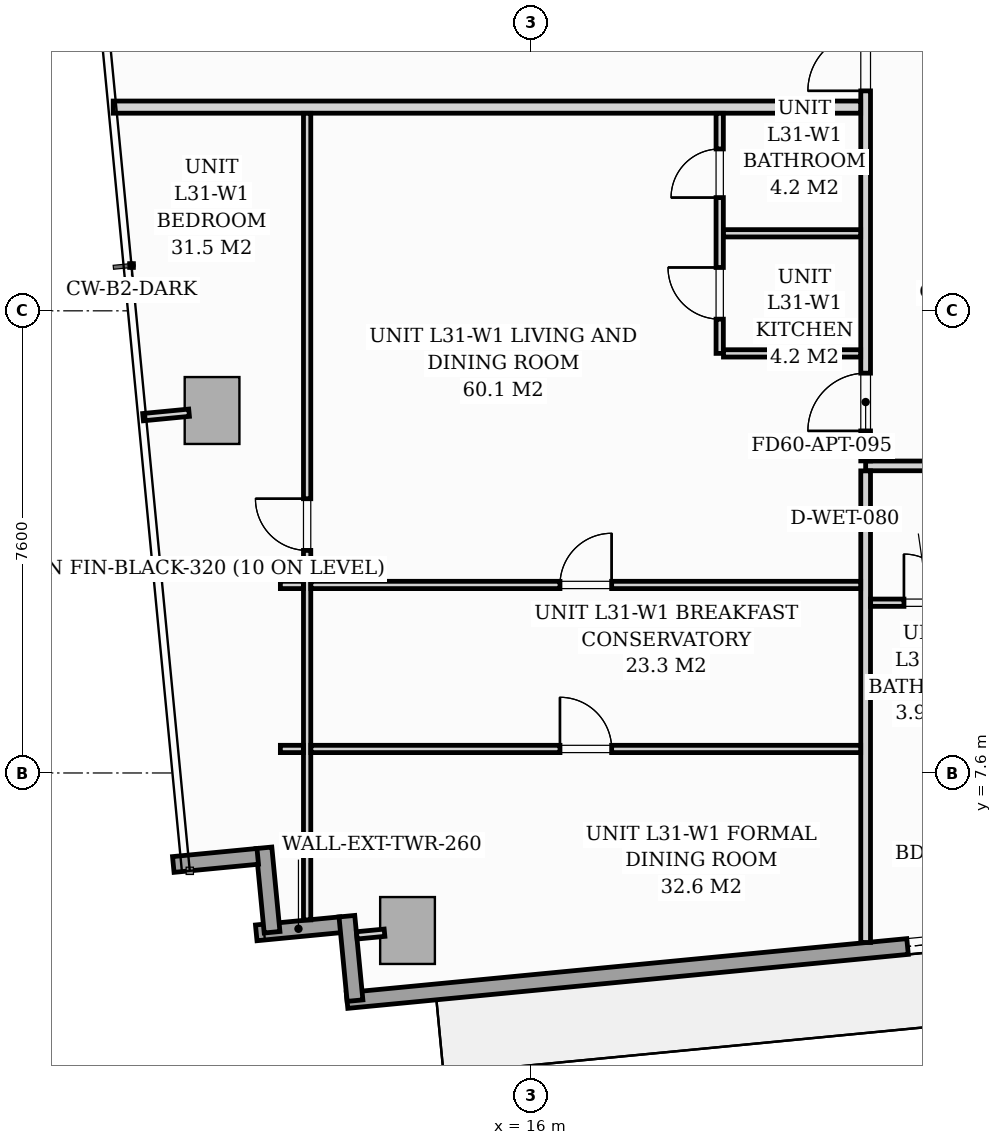
"""IFC4 building model, lengths in metres.
Left out: names, types, materials, properties, quantities, classifications, styles, units other than length and angle.
Written with IfcOpenShell. Run it as: python <this file> out.ifc"""

import sys

from ifc_helpers import new_model, si_unit, direction, frame, frame_2d, origin, origin_2d, place, context, subcontext, project, spatial, rectangle, extrude, source, transform, mapped, element, fill, save


model = new_model("IFC4")
c1 = context("Model", 3, precision=1e-05, world=origin(), true_north=direction((0.0, 1.0)))
c2 = subcontext(c1, "Body", "Model", "MODEL_VIEW")
j1 = project(units=[si_unit("LENGTHUNIT", "METRE"), si_unit("PLANEANGLEUNIT", "RADIAN")], contexts=[c1])
p1 = place(None, origin())
s1 = spatial("IfcSite", under=j1, at=p1, CompositionType="ELEMENT")
p2 = place(p1, origin())
s2 = spatial("IfcBuilding", under=s1, at=p2, CompositionType="ELEMENT")
p3 = place(p2, frame((0.0, 0.0, 109.8)))
s3 = spatial("IfcBuildingStorey", under=s2, at=p3, CompositionType="ELEMENT", Elevation=109.8)
m1 = source(origin(), c2, "Body", "SweptSolid", [
    extrude(rectangle(XDim=0.9, YDim=1.1, at=origin_2d()), origin(), (0.0, 0.0, 1.0), 3.196),
])
for number, where, z_axis, x_axis in (
    (1, (13.966, 5.01, 0.002), (0.0, 0.0, 1.0), (0.995, 0.096, 0.0)),
    (2, (10.752, 13.561, 0.002), (0.0, 0.0, 1.0), (0.995, 0.096, 0.0)),
):
    element("IfcColumn", number, at=place(p3, frame(where, z_axis=z_axis, x_axis=x_axis)), inside=s3, PredefinedType="COLUMN", context=c2, shape_type="MappedRepresentation", body=[
        mapped(m1, transform((0.0, 0.0, 0.0), scale=1.0)),
    ])
for number, where, z_axis, x_axis in (
    (3, (12.867, 5.104, 0.0), (0.0, 0.0, 1.0), (-0.995, -0.096, 0.0)),
    (4, (11.739, 4.981, 0.0), (0.0, 0.0, 1.0), (-0.096, 0.995, 0.0)),
):
    element("IfcWall", number, at=place(p3, frame(where, z_axis=z_axis, x_axis=x_axis)), inside=s3, PredefinedType="STANDARD", context=c2, shape_type="SweptSolid", body=[
        extrude(rectangle(XDim=1.395, YDim=0.26, at=frame_2d((0.697, 0.0))), origin(), (0.0, 0.0, 1.0), 2.94),
    ])
p4 = place(p3, frame((11.503, 6.229, 0.0), z_axis=(0.0, 0.0, 1.0), x_axis=(-0.995391056452, -0.09589913835, 0.0)))
e5 = element("IfcWall", 5, at=p4, inside=s3, PredefinedType="STANDARD", context=c2, shape_type="SweptSolid", body=[
    extrude(rectangle(XDim=1.395, YDim=0.26, at=frame_2d((0.698, 0.0))), origin(), (0.0, 0.0, 1.0), 2.94),
])
p5 = place(p3, frame((31.994, 5.69, 0.0), z_axis=(0.0, 0.0, 1.0), x_axis=(-0.995396521236, -0.095842399342, 0.0)))
e6 = element("IfcWall", 6, at=p5, inside=s3, PredefinedType="STANDARD", context=c2, shape_type="SweptSolid", body=[
    extrude(rectangle(XDim=19.11, YDim=0.26, at=frame_2d((9.555, 0.0))), origin(), (0.0, 0.0, 1.0), 2.94),
])
p6 = place(p5, frame((8.05, 0.0, 0.0)))
e7 = element("IfcOpeningElement", 7, at=p6, cuts=e6, PredefinedType="OPENING", context=c2, shape_type="SweptSolid", body=[
    extrude(rectangle(XDim=1.8, YDim=2.06, at=frame_2d((0.9, 1.03))), frame((0.0, 0.14, 0.0), z_axis=(0.0, -1.0, 0.0), x_axis=(1.0, 0.0, 0.0)), (0.0, 0.0, 1.0), 0.28),
])
p7 = place(p5, frame((2.5, 0.0, 0.65)))
e8 = element("IfcOpeningElement", 8, at=p7, cuts=e6, PredefinedType="OPENING", context=c2, shape_type="SweptSolid", body=[
    extrude(rectangle(XDim=1.6, YDim=1.5, at=frame_2d((0.8, 0.75))), frame((0.0, 0.14, 0.0), z_axis=(0.0, -1.0, 0.0), x_axis=(1.0, 0.0, 0.0)), (0.0, 0.0, 1.0), 0.28),
])
p8 = place(p3, frame((13.103, 3.856, 0.0), z_axis=(0.0, 0.0, 1.0), x_axis=(-0.09589913835, 0.995391056452, 0.0)))
e9 = element("IfcWall", 9, at=p8, inside=s3, PredefinedType="STANDARD", context=c2, shape_type="SweptSolid", body=[
    extrude(rectangle(XDim=1.395, YDim=0.26, at=frame_2d((0.698, 0.0))), origin(), (0.0, 0.0, 1.0), 2.94),
])
p9 = place(p3, frame((21.5, 12.65, 0.0), z_axis=(0.0, 0.0, 1.0), x_axis=(1.0, 0.0, 0.0)))
e10 = element("IfcWall", 10, at=p9, inside=s3, PredefinedType="PARTITIONING", context=c2, shape_type="SweptSolid", body=[
    extrude(rectangle(XDim=26.2, YDim=0.16, at=frame_2d((13.1, 0.0))), origin(), (0.0, 0.0, 1.0), 2.94),
])
p10 = place(p9, frame((5.927, 0.0, 0.0)))
e11 = element("IfcOpeningElement", 11, at=p10, cuts=e10, PredefinedType="OPENING", context=c2, shape_type="SweptSolid", body=[
    extrude(rectangle(XDim=0.95, YDim=2.06, at=frame_2d((0.475, 1.03))), frame((0.0, 0.09, 0.0), z_axis=(0.0, -1.0, 0.0), x_axis=(1.0, 0.0, 0.0)), (0.0, 0.0, 1.0), 0.18),
])
p11 = place(p9, frame((10.575, 0.0, 0.0)))
e12 = element("IfcOpeningElement", 12, at=p11, cuts=e10, PredefinedType="OPENING", context=c2, shape_type="SweptSolid", body=[
    extrude(rectangle(XDim=0.95, YDim=2.06, at=frame_2d((0.475, 1.03))), frame((0.0, 0.09, 0.0), z_axis=(0.0, -1.0, 0.0), x_axis=(1.0, 0.0, 0.0)), (0.0, 0.0, 1.0), 0.18),
])
p12 = place(p9, frame((19.322, 0.0, 0.0)))
e13 = element("IfcOpeningElement", 13, at=p12, cuts=e10, PredefinedType="OPENING", context=c2, shape_type="SweptSolid", body=[
    extrude(rectangle(XDim=0.95, YDim=2.06, at=frame_2d((0.475, 1.03))), frame((0.0, 0.09, 0.0), z_axis=(0.0, -1.0, 0.0), x_axis=(1.0, 0.0, 0.0)), (0.0, 0.0, 1.0), 0.18),
])
p13 = place(p3, frame((21.5, 4.812, 0.0), z_axis=(0.0, 0.0, 1.0), x_axis=(0.0, 1.0, 0.0)))
e14 = element("IfcWall", 14, at=p13, inside=s3, PredefinedType="PARTITIONING", context=c2, shape_type="SweptSolid", body=[
    extrude(rectangle(XDim=7.756, YDim=0.16, at=frame_2d((3.878, 0.0))), origin(), (0.0, 0.0, 1.0), 2.94),
])
p14 = place(p3, frame((21.5, 12.732, 0.0), z_axis=(0.0, 0.0, 1.0), x_axis=(0.0, 1.0, 0.0)))
e15 = element("IfcWall", 15, at=p14, inside=s3, PredefinedType="PARTITIONING", context=c2, shape_type="SweptSolid", body=[
    extrude(rectangle(XDim=11.647, YDim=0.16, at=frame_2d((5.823, 0.0))), origin(), (0.0, 0.0, 1.0), 2.94),
])
p15 = place(p14, frame((0.493, 0.0, 0.0)))
e16 = element("IfcOpeningElement", 16, at=p15, cuts=e15, PredefinedType="OPENING", context=c2, shape_type="SweptSolid", body=[
    extrude(rectangle(XDim=0.95, YDim=2.06, at=frame_2d((0.475, 1.03))), frame((0.0, 0.09, 0.0), z_axis=(0.0, -1.0, 0.0), x_axis=(1.0, 0.0, 0.0)), (0.0, 0.0, 1.0), 0.18),
])
p16 = place(p14, frame((6.085, 0.0, 0.0)))
e17 = element("IfcOpeningElement", 17, at=p16, cuts=e15, PredefinedType="OPENING", context=c2, shape_type="SweptSolid", body=[
    extrude(rectangle(XDim=0.95, YDim=2.06, at=frame_2d((0.475, 1.03))), frame((0.0, 0.09, 0.0), z_axis=(0.0, -1.0, 0.0), x_axis=(1.0, 0.0, 0.0)), (0.0, 0.0, 1.0), 0.18),
])
p17 = place(p3, frame((21.582, 10.4, 0.0), z_axis=(0.0, 0.0, 1.0), x_axis=(1.0, 0.0, 0.0)))
e18 = element("IfcWall", 18, at=p17, inside=s3, PredefinedType="PARTITIONING", context=c2, shape_type="SweptSolid", body=[
    extrude(rectangle(XDim=4.098, YDim=0.12, at=frame_2d((2.049, 0.0))), origin(), (0.0, 0.0, 1.0), 2.94),
])
p18 = place(p17, frame((0.548, 0.0, 0.0)))
e19 = element("IfcOpeningElement", 19, at=p18, cuts=e18, PredefinedType="OPENING", context=c2, shape_type="SweptSolid", body=[
    extrude(rectangle(XDim=0.8, YDim=2.02, at=frame_2d((0.4, 1.01))), frame((0.0, 0.07, 0.0), z_axis=(0.0, -1.0, 0.0), x_axis=(1.0, 0.0, 0.0)), (0.0, 0.0, 1.0), 0.14),
])
p19 = place(p17, frame((2.573, 0.0, 0.0)))
e20 = element("IfcOpeningElement", 20, at=p19, cuts=e18, PredefinedType="OPENING", context=c2, shape_type="SweptSolid", body=[
    extrude(rectangle(XDim=0.85, YDim=2.05, at=frame_2d((0.425, 1.025))), frame((0.0, 0.07, 0.0), z_axis=(0.0, -1.0, 0.0), x_axis=(1.0, 0.0, 0.0)), (0.0, 0.0, 1.0), 0.14),
])
p20 = place(p3, frame((9.126, 18.55, 0.0), z_axis=(0.0, 0.0, 1.0), x_axis=(1.0, 0.0, 0.0)))
e21 = element("IfcWall", 21, at=p20, inside=s3, PredefinedType="PARTITIONING", context=c2, shape_type="SweptSolid", body=[
    extrude(rectangle(XDim=12.292, YDim=0.2, at=frame_2d((6.146, 0.0))), origin(), (0.0, 0.0, 1.0), 2.94),
])
p21 = place(p3, frame((19.1, 14.5, 0.0), z_axis=(0.0, 0.0, 1.0), x_axis=(0.0, 1.0, 0.0)))
e22 = element("IfcWall", 22, at=p21, inside=s3, PredefinedType="PARTITIONING", context=c2, shape_type="SweptSolid", body=[
    extrude(rectangle(XDim=3.948, YDim=0.12, at=frame_2d((1.974, 0.0))), origin(), (0.0, 0.0, 1.0), 2.94),
])
p22 = place(p21, frame((0.563, 0.0, 0.0)))
e23 = element("IfcOpeningElement", 23, at=p22, cuts=e22, PredefinedType="OPENING", context=c2, shape_type="SweptSolid", body=[
    extrude(rectangle(XDim=0.85, YDim=2.05, at=frame_2d((0.425, 1.025))), frame((0.0, 0.07, 0.0), z_axis=(0.0, -1.0, 0.0), x_axis=(1.0, 0.0, 0.0)), (0.0, 0.0, 1.0), 0.14),
])
p23 = place(p21, frame((2.562, 0.0, 0.0)))
e24 = element("IfcOpeningElement", 24, at=p23, cuts=e22, PredefinedType="OPENING", context=c2, shape_type="SweptSolid", body=[
    extrude(rectangle(XDim=0.8, YDim=2.02, at=frame_2d((0.4, 1.01))), frame((0.0, 0.07, 0.0), z_axis=(0.0, -1.0, 0.0), x_axis=(1.0, 0.0, 0.0)), (0.0, 0.0, 1.0), 0.14),
])
for number, where, z_axis, x_axis in (
    (25, (19.162, 16.475, 0.0), (0.0, 0.0, 1.0), (1.0, 0.0, 0.0)),
    (26, (19.162, 14.5, 0.0), (0.0, 0.0, 1.0), (1.0, 0.0, 0.0)),
):
    element("IfcWall", number, at=place(p3, frame(where, z_axis=z_axis, x_axis=x_axis)), inside=s3, PredefinedType="PARTITIONING", context=c2, shape_type="SweptSolid", body=[
        extrude(rectangle(XDim=2.256, YDim=0.12, at=frame_2d((1.128, 0.0))), origin(), (0.0, 0.0, 1.0), 2.94),
    ])
p24 = place(p3, frame((12.315, 5.184, 0.0), z_axis=(0.0, 0.0, 1.0), x_axis=(0.0, 1.0, 0.0)))
e27 = element("IfcWall", 27, at=p24, inside=s3, PredefinedType="PARTITIONING", context=c2, shape_type="SweptSolid", body=[
    extrude(rectangle(XDim=13.264, YDim=0.12, at=frame_2d((6.632, 0.0))), origin(), (0.0, 0.0, 1.0), 2.94),
])
p25 = place(p24, frame((6.076, 0.0, 0.0)))
e28 = element("IfcOpeningElement", 28, at=p25, cuts=e27, PredefinedType="OPENING", context=c2, shape_type="SweptSolid", body=[
    extrude(rectangle(XDim=0.85, YDim=2.05, at=frame_2d((0.425, 1.025))), frame((0.0, 0.07, 0.0), z_axis=(0.0, -1.0, 0.0), x_axis=(1.0, 0.0, 0.0)), (0.0, 0.0, 1.0), 0.14),
])
p26 = place(p3, frame((11.875, 7.995, 0.0), z_axis=(0.0, 0.0, 1.0), x_axis=(1.0, 0.0, 0.0)))
e29 = element("IfcWall", 29, at=p26, inside=s3, PredefinedType="PARTITIONING", context=c2, shape_type="SweptSolid", body=[
    extrude(rectangle(XDim=0.378, YDim=0.12, at=frame_2d((0.189, 0.0))), origin(), (0.0, 0.0, 1.0), 2.94),
])
p27 = place(p3, frame((12.377, 7.995, 0.0), z_axis=(0.0, 0.0, 1.0), x_axis=(1.0, 0.0, 0.0)))
e30 = element("IfcWall", 30, at=p27, inside=s3, PredefinedType="PARTITIONING", context=c2, shape_type="SweptSolid", body=[
    extrude(rectangle(XDim=9.041, YDim=0.12, at=frame_2d((4.521, 0.0))), origin(), (0.0, 0.0, 1.0), 2.94),
])
p28 = place(p27, frame((4.096, 0.0, 0.0)))
e31 = element("IfcOpeningElement", 31, at=p28, cuts=e30, PredefinedType="OPENING", context=c2, shape_type="SweptSolid", body=[
    extrude(rectangle(XDim=0.85, YDim=2.05, at=frame_2d((0.425, 1.025))), frame((0.0, 0.07, 0.0), z_axis=(0.0, -1.0, 0.0), x_axis=(1.0, 0.0, 0.0)), (0.0, 0.0, 1.0), 0.14),
])
p29 = place(p3, frame((11.875, 10.692, 0.0), z_axis=(0.0, 0.0, 1.0), x_axis=(1.0, 0.0, 0.0)))
e32 = element("IfcWall", 32, at=p29, inside=s3, PredefinedType="PARTITIONING", context=c2, shape_type="SweptSolid", body=[
    extrude(rectangle(XDim=0.378, YDim=0.12, at=frame_2d((0.189, 0.0))), origin(), (0.0, 0.0, 1.0), 2.94),
])
p30 = place(p3, frame((12.377, 10.692, 0.0), z_axis=(0.0, 0.0, 1.0), x_axis=(1.0, 0.0, 0.0)))
e33 = element("IfcWall", 33, at=p30, inside=s3, PredefinedType="PARTITIONING", context=c2, shape_type="SweptSolid", body=[
    extrude(rectangle(XDim=9.041, YDim=0.12, at=frame_2d((4.521, 0.0))), origin(), (0.0, 0.0, 1.0), 2.94),
])
p31 = place(p30, frame((4.096, 0.0, 0.0)))
e34 = element("IfcOpeningElement", 34, at=p31, cuts=e33, PredefinedType="OPENING", context=c2, shape_type="SweptSolid", body=[
    extrude(rectangle(XDim=0.85, YDim=2.05, at=frame_2d((0.425, 1.025))), frame((0.0, 0.07, 0.0), z_axis=(0.0, -1.0, 0.0), x_axis=(1.0, 0.0, 0.0)), (0.0, 0.0, 1.0), 0.14),
])
p32 = place(p3, frame((13.588, 4.973, 0.0), z_axis=(0.0, 0.0, 1.0), x_axis=(-0.995435366701, -0.095438098896, 0.0)))
e35 = element("IfcWall", 35, at=p32, inside=s3, PredefinedType="PARTITIONING", context=c2, shape_type="SweptSolid", body=[
    extrude(rectangle(XDim=0.458, YDim=0.12, at=frame_2d((0.229, 0.0))), origin(), (0.0, 0.0, 1.0), 2.94),
])
p33 = place(p3, frame((10.373, 13.524, 0.0), z_axis=(0.0, 0.0, 1.0), x_axis=(-0.995377786728, -0.096036772582, 0.0)))
e36 = element("IfcWall", 36, at=p33, inside=s3, PredefinedType="PARTITIONING", context=c2, shape_type="SweptSolid", body=[
    extrude(rectangle(XDim=0.76, YDim=0.12, at=frame_2d((0.38, 0.0))), origin(), (0.0, 0.0, 1.0), 2.94),
])
m2 = source(origin(), c2, "Body", "SweptSolid", [
    extrude(rectangle(XDim=1.8, YDim=2.06, at=frame_2d((0.9, 1.03))), frame((0.0, 0.025, 0.0), z_axis=(0.0, -1.0, 0.0), x_axis=(1.0, 0.0, 0.0)), (0.0, 0.0, 1.0), 0.05),
])
p34 = place(p6, origin())
e37 = element("IfcDoor", 37, at=p34, inside=s3, OperationType="SLIDING_TO_LEFT", PredefinedType="DOOR", context=c2, shape_type="MappedRepresentation", body=[
    mapped(m2, transform((0.0, 0.0, 0.0), scale=1.0)),
])
fill(e7, e37)
m3 = source(origin(), c2, "Body", "SweptSolid", [
    extrude(rectangle(XDim=0.8, YDim=2.02, at=frame_2d((0.4, 1.01))), frame((0.0, 0.025, 0.0), z_axis=(0.0, -1.0, 0.0), x_axis=(1.0, 0.0, 0.0)), (0.0, 0.0, 1.0), 0.05),
])
p35 = place(p18, origin())
e38 = element("IfcDoor", 38, at=p35, inside=s3, OperationType="SINGLE_SWING_LEFT", PredefinedType="DOOR", context=c2, shape_type="MappedRepresentation", body=[
    mapped(m3, transform((0.0, 0.0, 0.0), scale=1.0)),
])
fill(e19, e38)
m4 = source(origin(), c2, "Body", "SweptSolid", [
    extrude(rectangle(XDim=0.95, YDim=2.06, at=frame_2d((0.475, 1.03))), frame((0.0, 0.025, 0.0), z_axis=(0.0, -1.0, 0.0), x_axis=(1.0, 0.0, 0.0)), (0.0, 0.0, 1.0), 0.05),
])
p36 = place(p15, origin())
e39 = element("IfcDoor", 39, at=p36, inside=s3, OperationType="SINGLE_SWING_LEFT", PredefinedType="DOOR", context=c2, shape_type="MappedRepresentation", body=[
    mapped(m4, transform((0.0, 0.0, 0.0), scale=1.0)),
])
fill(e16, e39)
m5 = source(origin(), c2, "Body", "SweptSolid", [
    extrude(rectangle(XDim=0.85, YDim=2.05, at=frame_2d((0.425, 1.025))), frame((0.0, 0.025, 0.0), z_axis=(0.0, -1.0, 0.0), x_axis=(1.0, 0.0, 0.0)), (0.0, 0.0, 1.0), 0.05),
])
p37 = place(p22, origin())
e40 = element("IfcDoor", 40, at=p37, inside=s3, OperationType="SINGLE_SWING_RIGHT", PredefinedType="DOOR", context=c2, shape_type="MappedRepresentation", body=[
    mapped(m5, transform((0.0, 0.0, 0.0), scale=1.0)),
])
fill(e23, e40)
p38 = place(p23, origin())
e41 = element("IfcDoor", 41, at=p38, inside=s3, OperationType="SINGLE_SWING_LEFT", PredefinedType="DOOR", context=c2, shape_type="MappedRepresentation", body=[
    mapped(m3, transform((0.0, 0.0, 0.0), scale=1.0)),
])
fill(e24, e41)
p39 = place(p25, origin())
e42 = element("IfcDoor", 42, at=p39, inside=s3, OperationType="SINGLE_SWING_RIGHT", PredefinedType="DOOR", context=c2, shape_type="MappedRepresentation", body=[
    mapped(m5, transform((0.0, 0.0, 0.0), scale=1.0)),
])
fill(e28, e42)
p40 = place(p28, origin())
e43 = element("IfcDoor", 43, at=p40, inside=s3, OperationType="SINGLE_SWING_LEFT", PredefinedType="DOOR", context=c2, shape_type="MappedRepresentation", body=[
    mapped(m5, transform((0.0, 0.0, 0.0), scale=1.0)),
])
fill(e31, e43)
p41 = place(p31, origin())
e44 = element("IfcDoor", 44, at=p41, inside=s3, OperationType="SINGLE_SWING_RIGHT", PredefinedType="DOOR", context=c2, shape_type="MappedRepresentation", body=[
    mapped(m5, transform((0.0, 0.0, 0.0), scale=1.0)),
])
fill(e34, e44)
p42 = place(p16, origin())
e45 = element("IfcDoor", 45, at=p42, inside=s3, OperationType="SINGLE_SWING_LEFT", PredefinedType="DOOR", context=c2, shape_type="MappedRepresentation", body=[
    mapped(m4, transform((0.0, 0.0, 0.0), scale=1.0)),
])
fill(e17, e45)
save(model, sys.argv[1])
